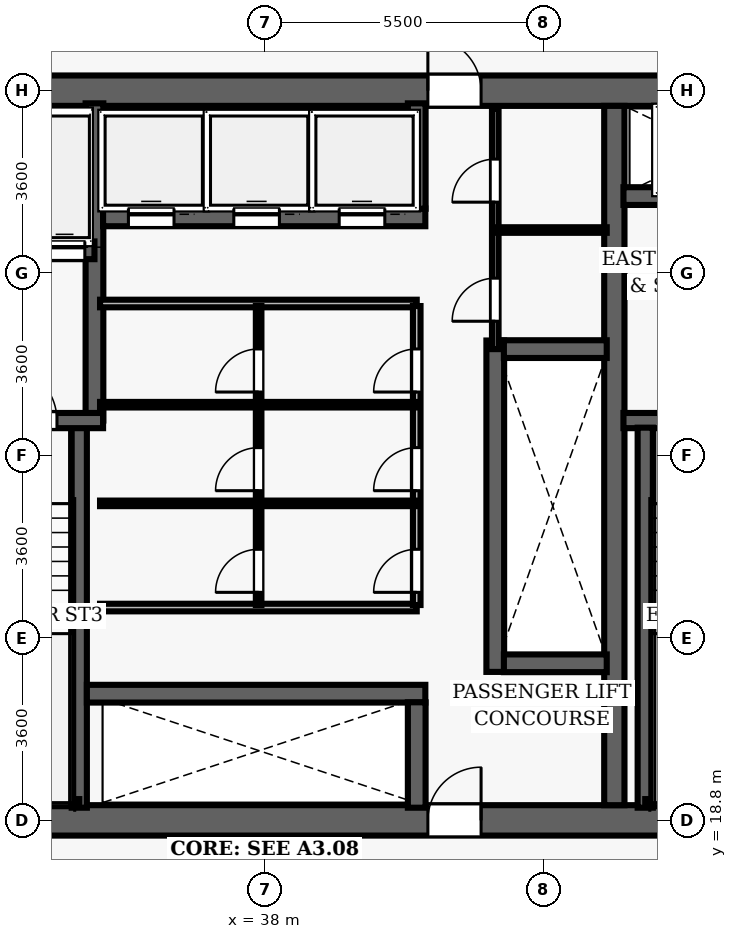
"""IFC4 building model, lengths in metres.
Left out: names, types, materials, properties, quantities, classifications, styles, units other than length and angle.
Written with IfcOpenShell. Run it as: python <this file> out.ifc"""

import sys

from ifc_helpers import new_model, si_unit, direction, frame, frame_2d, origin, place, context, subcontext, project, spatial, rectangle, extrude, element, fill, save


model = new_model("IFC4")
c1 = context("Model", 3, precision=1e-05, world=origin(), true_north=direction((0.0, 1.0)))
c2 = subcontext(c1, "Body", "Model", "MODEL_VIEW")
j1 = project(units=[si_unit("LENGTHUNIT", "METRE"), si_unit("PLANEANGLEUNIT", "RADIAN")], contexts=[c1])
p1 = place(None, origin())
s1 = spatial("IfcSite", under=j1, at=p1, CompositionType="ELEMENT")
p2 = place(p1, origin())
s2 = spatial("IfcBuilding", under=s1, at=p2, CompositionType="ELEMENT")
p3 = place(p2, frame((0.0, 0.0, 86.9)))
s3 = spatial("IfcBuildingStorey", under=s2, at=p3, CompositionType="ELEMENT", Elevation=86.9)
p4 = place(p3, frame((26.7, 18.8, 0.0), z_axis=(0.0, 0.0, 1.0), x_axis=(1.0, 0.0, 0.0)))
e1 = element("IfcWall", 1, at=p4, inside=s3, PredefinedType="SHEAR", context=c2, shape_type="SweptSolid", body=[
    extrude(rectangle(XDim=22.6, YDim=0.6, at=frame_2d((11.3, 0.0))), origin(), (0.0, 0.0, 1.0), 3.5),
])
p5 = place(p4, frame((14.52, 0.0, 0.0)))
e2 = element("IfcOpeningElement", 2, at=p5, cuts=e1, PredefinedType="OPENING", context=c2, shape_type="SweptSolid", body=[
    extrude(rectangle(XDim=1.05, YDim=2.15, at=frame_2d((0.525, 1.075))), frame((0.0, 0.31, 0.0), z_axis=(0.0, -1.0, 0.0), x_axis=(1.0, 0.0, 0.0)), (0.0, 0.0, 1.0), 0.62),
])
p6 = place(p3, frame((26.7, 33.2, 0.0), z_axis=(0.0, 0.0, 1.0), x_axis=(1.0, 0.0, 0.0)))
e3 = element("IfcWall", 3, at=p6, inside=s3, PredefinedType="SHEAR", context=c2, shape_type="SweptSolid", body=[
    extrude(rectangle(XDim=22.6, YDim=0.6, at=frame_2d((11.3, 0.0))), origin(), (0.0, 0.0, 1.0), 3.5),
])
p7 = place(p6, frame((4.62, 0.0, 0.0)))
e4 = element("IfcOpeningElement", 4, at=p7, cuts=e3, PredefinedType="OPENING", context=c2, shape_type="SweptSolid", body=[
    extrude(rectangle(XDim=1.05, YDim=2.15, at=frame_2d((0.525, 1.075))), frame((0.0, 0.31, 0.0), z_axis=(0.0, -1.0, 0.0), x_axis=(1.0, 0.0, 0.0)), (0.0, 0.0, 1.0), 0.62),
])
p8 = place(p6, frame((14.52, 0.0, 0.0)))
e5 = element("IfcOpeningElement", 5, at=p8, cuts=e3, PredefinedType="OPENING", context=c2, shape_type="SweptSolid", body=[
    extrude(rectangle(XDim=1.05, YDim=2.15, at=frame_2d((0.525, 1.075))), frame((0.0, 0.31, 0.0), z_axis=(0.0, -1.0, 0.0), x_axis=(1.0, 0.0, 0.0)), (0.0, 0.0, 1.0), 0.62),
])
p9 = place(p3, frame((44.9, 19.1, 0.0), z_axis=(0.0, 0.0, 1.0), x_axis=(0.0, 1.0, 0.0)))
e6 = element("IfcWall", 6, at=p9, inside=s3, PredefinedType="SHEAR", context=c2, shape_type="SweptSolid", body=[
    extrude(rectangle(XDim=13.8, YDim=0.4, at=frame_2d((6.9, 0.0))), origin(), (0.0, 0.0, 1.0), 3.5),
])
p10 = place(p3, frame((45.08, 26.69, 0.0), z_axis=(0.0, 0.0, 1.0), x_axis=(1.0, 0.0, 0.0)))
e7 = element("IfcWall", 7, at=p10, inside=s3, PredefinedType="SHEAR", context=c2, shape_type="SweptSolid", body=[
    extrude(rectangle(XDim=3.67, YDim=0.3, at=frame_2d((1.835, 0.0))), origin(), (0.0, 0.0, 1.0), 3.5),
])
p11 = place(p10, frame((1.05, 0.0, 0.0)))
e8 = element("IfcOpeningElement", 8, at=p11, cuts=e7, PredefinedType="OPENING", context=c2, shape_type="SweptSolid", body=[
    extrude(rectangle(XDim=1.1, YDim=2.15, at=frame_2d((0.55, 1.075))), frame((0.0, 0.16, 0.0), z_axis=(0.0, -1.0, 0.0), x_axis=(1.0, 0.0, 0.0)), (0.0, 0.0, 1.0), 0.32),
])
p12 = place(p3, frame((45.51, 19.05, 0.0), z_axis=(0.0, 0.0, 1.0), x_axis=(0.0, 1.0, 0.0)))
e9 = element("IfcWall", 9, at=p12, inside=s3, PredefinedType="SHEAR", context=c2, shape_type="SweptSolid", body=[
    extrude(rectangle(XDim=7.5, YDim=0.3, at=frame_2d((3.75, 0.0))), origin(), (0.0, 0.0, 1.0), 3.5),
])
p13 = place(p3, frame((45.51, 19.16, 0.0), z_axis=(0.0, 0.0, 1.0), x_axis=(1.0, 0.0, 0.0)))
e10 = element("IfcWall", 10, at=p13, inside=s3, PredefinedType="SHEAR", context=c2, shape_type="SweptSolid", body=[
    extrude(rectangle(XDim=3.095, YDim=0.12, at=frame_2d((1.547, 0.0))), origin(), (0.0, 0.0, 1.0), 3.5),
])
p14 = place(p3, frame((45.08, 31.12, 0.0), z_axis=(0.0, 0.0, 1.0), x_axis=(1.0, 0.0, 0.0)))
e11 = element("IfcWall", 11, at=p14, inside=s3, PredefinedType="SHEAR", context=c2, shape_type="SweptSolid", body=[
    extrude(rectangle(XDim=3.67, YDim=0.35, at=frame_2d((1.835, 0.0))), origin(), (0.0, 0.0, 1.0), 2.6),
])
p15 = place(p14, frame((1.25, 0.0, 0.0)))
e12 = element("IfcOpeningElement", 12, at=p15, cuts=e11, PredefinedType="OPENING", context=c2, shape_type="SweptSolid", body=[
    extrude(rectangle(XDim=1.1, YDim=2.15, at=frame_2d((0.55, 1.075))), frame((0.0, 0.185, 0.0), z_axis=(0.0, -1.0, 0.0), x_axis=(1.0, 0.0, 0.0)), (0.0, 0.0, 1.0), 0.37),
])
p16 = place(p3, frame((34.34, 19.05, 0.0), z_axis=(0.0, 0.0, 1.0), x_axis=(0.0, 1.0, 0.0)))
e13 = element("IfcWall", 13, at=p16, inside=s3, PredefinedType="SHEAR", context=c2, shape_type="SweptSolid", body=[
    extrude(rectangle(XDim=7.5, YDim=0.3, at=frame_2d((3.75, 0.0))), origin(), (0.0, 0.0, 1.0), 3.5),
])
p17 = place(p3, frame((34.64, 26.69, 0.0), z_axis=(0.0, 0.0, 1.0), x_axis=(0.0, 1.0, 0.0)))
e14 = element("IfcWall", 14, at=p17, inside=s3, PredefinedType="SHEAR", context=c2, shape_type="SweptSolid", body=[
    extrude(rectangle(XDim=6.26, YDim=0.35, at=frame_2d((3.13, 0.0))), origin(), (0.0, 0.0, 1.0), 3.5),
])
p18 = place(p3, frame((31.25, 26.69, 0.0), z_axis=(0.0, 0.0, 1.0), x_axis=(1.0, 0.0, 0.0)))
e15 = element("IfcWall", 15, at=p18, inside=s3, PredefinedType="SHEAR", context=c2, shape_type="SweptSolid", body=[
    extrude(rectangle(XDim=3.56, YDim=0.3, at=frame_2d((1.78, 0.0))), origin(), (0.0, 0.0, 1.0), 3.5),
])
p19 = place(p18, frame((1.55, 0.0, 0.0)))
e16 = element("IfcOpeningElement", 16, at=p19, cuts=e15, PredefinedType="OPENING", context=c2, shape_type="SweptSolid", body=[
    extrude(rectangle(XDim=1.1, YDim=2.15, at=frame_2d((0.55, 1.075))), frame((0.0, 0.16, 0.0), z_axis=(0.0, -1.0, 0.0), x_axis=(1.0, 0.0, 0.0)), (0.0, 0.0, 1.0), 0.32),
])
p20 = place(p3, frame((31.3, 19.16, 0.0), z_axis=(0.0, 0.0, 1.0), x_axis=(1.0, 0.0, 0.0)))
e17 = element("IfcWall", 17, at=p20, inside=s3, PredefinedType="SHEAR", context=c2, shape_type="SweptSolid", body=[
    extrude(rectangle(XDim=3.04, YDim=0.12, at=frame_2d((1.52, 0.0))), origin(), (0.0, 0.0, 1.0), 3.5),
])
p21 = place(p3, frame((32.23, 30.05, 0.0), z_axis=(0.0, 0.0, 1.0), x_axis=(1.0, 0.0, 0.0)))
e18 = element("IfcWall", 18, at=p21, inside=s3, PredefinedType="SHEAR", context=c2, shape_type="SweptSolid", body=[
    extrude(rectangle(XDim=2.41, YDim=0.35, at=frame_2d((1.205, 0.0))), origin(), (0.0, 0.0, 1.0), 2.6),
])
p22 = place(p21, frame((0.42, 0.0, 0.0)))
e19 = element("IfcOpeningElement", 19, at=p22, cuts=e18, PredefinedType="OPENING", context=c2, shape_type="SweptSolid", body=[
    extrude(rectangle(XDim=0.8, YDim=2.15, at=frame_2d((0.4, 1.075))), frame((0.0, 0.185, 0.0), z_axis=(0.0, -1.0, 0.0), x_axis=(1.0, 0.0, 0.0)), (0.0, 0.0, 1.0), 0.37),
])
p23 = place(p21, frame((1.42, 0.0, 0.0)))
e20 = element("IfcOpeningElement", 20, at=p23, cuts=e18, PredefinedType="OPENING", context=c2, shape_type="SweptSolid", body=[
    extrude(rectangle(XDim=0.8, YDim=2.15, at=frame_2d((0.4, 1.075))), frame((0.0, 0.185, 0.0), z_axis=(0.0, -1.0, 0.0), x_axis=(1.0, 0.0, 0.0)), (0.0, 0.0, 1.0), 0.37),
])
p24 = place(p3, frame((42.55, 21.73, 0.0), z_axis=(0.0, 0.0, 1.0), x_axis=(0.0, 1.0, 0.0)))
e21 = element("IfcWall", 21, at=p24, inside=s3, PredefinedType="SHEAR", context=c2, shape_type="SweptSolid", body=[
    extrude(rectangle(XDim=6.54, YDim=0.35, at=frame_2d((3.27, 0.0))), origin(), (0.0, 0.0, 1.0), 2.6),
])
for number, where, z_axis, x_axis in (
    (22, (42.72, 21.9, 0.0), (0.0, 0.0, 1.0), (1.0, 0.0, 0.0)),
    (23, (42.72, 28.1, 0.0), (0.0, 0.0, 1.0), (1.0, 0.0, 0.0)),
):
    element("IfcWall", number, at=place(p3, frame(where, z_axis=z_axis, x_axis=x_axis)), inside=s3, PredefinedType="SHEAR", context=c2, shape_type="SweptSolid", body=[
        extrude(rectangle(XDim=2.03, YDim=0.35, at=frame_2d((1.015, 0.0))), origin(), (0.0, 0.0, 1.0), 2.6),
    ])
p25 = place(p3, frame((34.81, 30.7, 0.0), z_axis=(0.0, 0.0, 1.0), x_axis=(1.0, 0.0, 0.0)))
e24 = element("IfcWall", 24, at=p25, inside=s3, PredefinedType="SHEAR", context=c2, shape_type="SweptSolid", body=[
    extrude(rectangle(XDim=6.36, YDim=0.35, at=frame_2d((3.18, 0.0))), origin(), (0.0, 0.0, 1.0), 2.6),
])
p26 = place(p25, frame((0.5, 0.0, 0.0)))
e25 = element("IfcOpeningElement", 25, at=p26, cuts=e24, PredefinedType="OPENING", context=c2, shape_type="SweptSolid", body=[
    extrude(rectangle(XDim=0.9, YDim=2.15, at=frame_2d((0.45, 1.075))), frame((0.0, 0.185, 0.0), z_axis=(0.0, -1.0, 0.0), x_axis=(1.0, 0.0, 0.0)), (0.0, 0.0, 1.0), 0.37),
])
p27 = place(p25, frame((2.58, 0.0, 0.0)))
e26 = element("IfcOpeningElement", 26, at=p27, cuts=e24, PredefinedType="OPENING", context=c2, shape_type="SweptSolid", body=[
    extrude(rectangle(XDim=0.9, YDim=2.15, at=frame_2d((0.45, 1.075))), frame((0.0, 0.185, 0.0), z_axis=(0.0, -1.0, 0.0), x_axis=(1.0, 0.0, 0.0)), (0.0, 0.0, 1.0), 0.37),
])
p28 = place(p25, frame((4.66, 0.0, 0.0)))
e27 = element("IfcOpeningElement", 27, at=p28, cuts=e24, PredefinedType="OPENING", context=c2, shape_type="SweptSolid", body=[
    extrude(rectangle(XDim=0.9, YDim=2.15, at=frame_2d((0.45, 1.075))), frame((0.0, 0.185, 0.0), z_axis=(0.0, -1.0, 0.0), x_axis=(1.0, 0.0, 0.0)), (0.0, 0.0, 1.0), 0.37),
])
p29 = place(p3, frame((41.0, 30.87, 0.0), z_axis=(0.0, 0.0, 1.0), x_axis=(0.0, 1.0, 0.0)))
e28 = element("IfcWall", 28, at=p29, inside=s3, PredefinedType="SHEAR", context=c2, shape_type="SweptSolid", body=[
    extrude(rectangle(XDim=2.08, YDim=0.35, at=frame_2d((1.04, 0.0))), origin(), (0.0, 0.0, 1.0), 2.6),
])
p30 = place(p3, frame((34.49, 21.3, 0.0), z_axis=(0.0, 0.0, 1.0), x_axis=(1.0, 0.0, 0.0)))
e29 = element("IfcWall", 29, at=p30, inside=s3, PredefinedType="SHEAR", context=c2, shape_type="SweptSolid", body=[
    extrude(rectangle(XDim=6.68, YDim=0.35, at=frame_2d((3.34, 0.0))), origin(), (0.0, 0.0, 1.0), 2.6),
])
p31 = place(p3, frame((41.0, 19.05, 0.0), z_axis=(0.0, 0.0, 1.0), x_axis=(0.0, 1.0, 0.0)))
e30 = element("IfcWall", 30, at=p31, inside=s3, PredefinedType="SHEAR", context=c2, shape_type="SweptSolid", body=[
    extrude(rectangle(XDim=2.08, YDim=0.35, at=frame_2d((1.04, 0.0))), origin(), (0.0, 0.0, 1.0), 2.6),
])
for number, where, z_axis, x_axis in (
    (31, (34.75, 29.0, 0.0), (0.0, 0.0, 1.0), (1.0, 0.0, 0.0)),
    (32, (34.75, 23.0, 0.0), (0.0, 0.0, 1.0), (1.0, 0.0, 0.0)),
):
    element("IfcWall", number, at=place(p3, frame(where, z_axis=z_axis, x_axis=x_axis)), inside=s3, PredefinedType="PARTITIONING", context=c2, shape_type="SweptSolid", body=[
        extrude(rectangle(XDim=6.25, YDim=0.15, at=frame_2d((3.125, 0.0))), origin(), (0.0, 0.0, 1.0), 2.6),
    ])
p32 = place(p3, frame((41.0, 23.05, 0.0), z_axis=(0.0, 0.0, 1.0), x_axis=(0.0, 1.0, 0.0)))
e33 = element("IfcWall", 33, at=p32, inside=s3, PredefinedType="PARTITIONING", context=c2, shape_type="SweptSolid", body=[
    extrude(rectangle(XDim=5.9, YDim=0.15, at=frame_2d((2.95, 0.0))), origin(), (0.0, 0.0, 1.0), 2.6),
])
p33 = place(p32, frame((0.25, 0.0, 0.0)))
e34 = element("IfcOpeningElement", 34, at=p33, cuts=e33, PredefinedType="OPENING", context=c2, shape_type="SweptSolid", body=[
    extrude(rectangle(XDim=0.85, YDim=2.1, at=frame_2d((0.425, 1.05))), frame((0.0, 0.085, 0.0), z_axis=(0.0, -1.0, 0.0), x_axis=(1.0, 0.0, 0.0)), (0.0, 0.0, 1.0), 0.17),
])
p34 = place(p32, frame((2.256, 0.0, 0.0)))
e35 = element("IfcOpeningElement", 35, at=p34, cuts=e33, PredefinedType="OPENING", context=c2, shape_type="SweptSolid", body=[
    extrude(rectangle(XDim=0.85, YDim=2.1, at=frame_2d((0.425, 1.05))), frame((0.0, 0.085, 0.0), z_axis=(0.0, -1.0, 0.0), x_axis=(1.0, 0.0, 0.0)), (0.0, 0.0, 1.0), 0.17),
])
p35 = place(p32, frame((4.203, 0.0, 0.0)))
e36 = element("IfcOpeningElement", 36, at=p35, cuts=e33, PredefinedType="OPENING", context=c2, shape_type="SweptSolid", body=[
    extrude(rectangle(XDim=0.85, YDim=2.1, at=frame_2d((0.425, 1.05))), frame((0.0, 0.085, 0.0), z_axis=(0.0, -1.0, 0.0), x_axis=(1.0, 0.0, 0.0)), (0.0, 0.0, 1.0), 0.17),
])
p36 = place(p3, frame((37.88, 23.05, 0.0), z_axis=(0.0, 0.0, 1.0), x_axis=(0.0, 1.0, 0.0)))
e37 = element("IfcWall", 37, at=p36, inside=s3, PredefinedType="PARTITIONING", context=c2, shape_type="SweptSolid", body=[
    extrude(rectangle(XDim=5.9, YDim=0.11, at=frame_2d((2.95, 0.0))), origin(), (0.0, 0.0, 1.0), 2.6),
])
p37 = place(p36, frame((0.25, 0.0, 0.0)))
e38 = element("IfcOpeningElement", 38, at=p37, cuts=e37, PredefinedType="OPENING", context=c2, shape_type="SweptSolid", body=[
    extrude(rectangle(XDim=0.85, YDim=2.1, at=frame_2d((0.425, 1.05))), frame((0.0, 0.065, 0.0), z_axis=(0.0, -1.0, 0.0), x_axis=(1.0, 0.0, 0.0)), (0.0, 0.0, 1.0), 0.13),
])
p38 = place(p36, frame((2.256, 0.0, 0.0)))
e39 = element("IfcOpeningElement", 39, at=p38, cuts=e37, PredefinedType="OPENING", context=c2, shape_type="SweptSolid", body=[
    extrude(rectangle(XDim=0.85, YDim=2.1, at=frame_2d((0.425, 1.05))), frame((0.0, 0.065, 0.0), z_axis=(0.0, -1.0, 0.0), x_axis=(1.0, 0.0, 0.0)), (0.0, 0.0, 1.0), 0.13),
])
p39 = place(p36, frame((4.203, 0.0, 0.0)))
e40 = element("IfcOpeningElement", 40, at=p39, cuts=e37, PredefinedType="OPENING", context=c2, shape_type="SweptSolid", body=[
    extrude(rectangle(XDim=0.85, YDim=2.1, at=frame_2d((0.425, 1.05))), frame((0.0, 0.065, 0.0), z_axis=(0.0, -1.0, 0.0), x_axis=(1.0, 0.0, 0.0)), (0.0, 0.0, 1.0), 0.13),
])
for number, where, z_axis, x_axis in (
    (41, (34.75, 25.056, 0.0), (0.0, 0.0, 1.0), (1.0, 0.0, 0.0)),
    (42, (34.75, 27.003, 0.0), (0.0, 0.0, 1.0), (1.0, 0.0, 0.0)),
):
    element("IfcWall", number, at=place(p3, frame(where, z_axis=z_axis, x_axis=x_axis)), inside=s3, PredefinedType="PARTITIONING", context=c2, shape_type="SweptSolid", body=[
        extrude(rectangle(XDim=6.25, YDim=0.11, at=frame_2d((3.125, 0.0))), origin(), (0.0, 0.0, 1.0), 2.6),
    ])
p40 = place(p3, frame((42.55, 28.1, 0.0), z_axis=(0.0, 0.0, 1.0), x_axis=(0.0, 1.0, 0.0)))
e43 = element("IfcWall", 43, at=p40, inside=s3, PredefinedType="PARTITIONING", context=c2, shape_type="SweptSolid", body=[
    extrude(rectangle(XDim=4.75, YDim=0.13, at=frame_2d((2.375, 0.0))), origin(), (0.0, 0.0, 1.0), 2.6),
])
p41 = place(p40, frame((0.55, 0.0, 0.0)))
e44 = element("IfcOpeningElement", 44, at=p41, cuts=e43, PredefinedType="OPENING", context=c2, shape_type="SweptSolid", body=[
    extrude(rectangle(XDim=0.85, YDim=2.1, at=frame_2d((0.425, 1.05))), frame((0.0, 0.075, 0.0), z_axis=(0.0, -1.0, 0.0), x_axis=(1.0, 0.0, 0.0)), (0.0, 0.0, 1.0), 0.15),
])
p42 = place(p40, frame((2.9, 0.0, 0.0)))
e45 = element("IfcOpeningElement", 45, at=p42, cuts=e43, PredefinedType="OPENING", context=c2, shape_type="SweptSolid", body=[
    extrude(rectangle(XDim=0.85, YDim=2.1, at=frame_2d((0.425, 1.05))), frame((0.0, 0.075, 0.0), z_axis=(0.0, -1.0, 0.0), x_axis=(1.0, 0.0, 0.0)), (0.0, 0.0, 1.0), 0.15),
])
p43 = place(p3, frame((42.55, 30.45, 0.0), z_axis=(0.0, 0.0, 1.0), x_axis=(1.0, 0.0, 0.0)))
e46 = element("IfcWall", 46, at=p43, inside=s3, PredefinedType="PARTITIONING", context=c2, shape_type="SweptSolid", body=[
    extrude(rectangle(XDim=2.2, YDim=0.11, at=frame_2d((1.1, 0.0))), origin(), (0.0, 0.0, 1.0), 2.6),
])
p44 = place(p19, origin())
e47 = element("IfcDoor", 47, at=p44, inside=s3, OperationType="SINGLE_SWING_LEFT", PredefinedType="DOOR", context=c2, shape_type="SweptSolid", body=[
    extrude(rectangle(XDim=1.1, YDim=2.15, at=frame_2d((0.55, 1.075))), frame((0.0, 0.025, 0.0), z_axis=(0.0, -1.0, 0.0), x_axis=(1.0, 0.0, 0.0)), (0.0, 0.0, 1.0), 0.05),
])
fill(e16, e47)
p45 = place(p8, origin())
e48 = element("IfcDoor", 48, at=p45, inside=s3, OperationType="SINGLE_SWING_LEFT", PredefinedType="DOOR", context=c2, shape_type="SweptSolid", body=[
    extrude(rectangle(XDim=1.05, YDim=2.15, at=frame_2d((0.525, 1.075))), frame((0.0, 0.025, 0.0), z_axis=(0.0, -1.0, 0.0), x_axis=(1.0, 0.0, 0.0)), (0.0, 0.0, 1.0), 0.05),
])
fill(e5, e48)
p46 = place(p5, origin())
e49 = element("IfcDoor", 49, at=p46, inside=s3, OperationType="SINGLE_SWING_RIGHT", PredefinedType="DOOR", context=c2, shape_type="SweptSolid", body=[
    extrude(rectangle(XDim=1.05, YDim=2.15, at=frame_2d((0.525, 1.075))), frame((0.0, 0.025, 0.0), z_axis=(0.0, -1.0, 0.0), x_axis=(1.0, 0.0, 0.0)), (0.0, 0.0, 1.0), 0.05),
])
fill(e2, e49)
p47 = place(p33, origin())
e50 = element("IfcDoor", 50, at=p47, inside=s3, OperationType="SINGLE_SWING_LEFT", PredefinedType="DOOR", context=c2, shape_type="SweptSolid", body=[
    extrude(rectangle(XDim=0.85, YDim=2.1, at=frame_2d((0.425, 1.05))), frame((0.0, 0.025, 0.0), z_axis=(0.0, -1.0, 0.0), x_axis=(1.0, 0.0, 0.0)), (0.0, 0.0, 1.0), 0.05),
])
fill(e34, e50)
p48 = place(p37, origin())
e51 = element("IfcDoor", 51, at=p48, inside=s3, OperationType="SINGLE_SWING_LEFT", PredefinedType="DOOR", context=c2, shape_type="SweptSolid", body=[
    extrude(rectangle(XDim=0.85, YDim=2.1, at=frame_2d((0.425, 1.05))), frame((0.0, 0.025, 0.0), z_axis=(0.0, -1.0, 0.0), x_axis=(1.0, 0.0, 0.0)), (0.0, 0.0, 1.0), 0.05),
])
fill(e38, e51)
p49 = place(p34, origin())
e52 = element("IfcDoor", 52, at=p49, inside=s3, OperationType="SINGLE_SWING_LEFT", PredefinedType="DOOR", context=c2, shape_type="SweptSolid", body=[
    extrude(rectangle(XDim=0.85, YDim=2.1, at=frame_2d((0.425, 1.05))), frame((0.0, 0.025, 0.0), z_axis=(0.0, -1.0, 0.0), x_axis=(1.0, 0.0, 0.0)), (0.0, 0.0, 1.0), 0.05),
])
fill(e35, e52)
p50 = place(p38, origin())
e53 = element("IfcDoor", 53, at=p50, inside=s3, OperationType="SINGLE_SWING_LEFT", PredefinedType="DOOR", context=c2, shape_type="SweptSolid", body=[
    extrude(rectangle(XDim=0.85, YDim=2.1, at=frame_2d((0.425, 1.05))), frame((0.0, 0.025, 0.0), z_axis=(0.0, -1.0, 0.0), x_axis=(1.0, 0.0, 0.0)), (0.0, 0.0, 1.0), 0.05),
])
fill(e39, e53)
p51 = place(p35, origin())
e54 = element("IfcDoor", 54, at=p51, inside=s3, OperationType="SINGLE_SWING_LEFT", PredefinedType="DOOR", context=c2, shape_type="SweptSolid", body=[
    extrude(rectangle(XDim=0.85, YDim=2.1, at=frame_2d((0.425, 1.05))), frame((0.0, 0.025, 0.0), z_axis=(0.0, -1.0, 0.0), x_axis=(1.0, 0.0, 0.0)), (0.0, 0.0, 1.0), 0.05),
])
fill(e36, e54)
p52 = place(p39, origin())
e55 = element("IfcDoor", 55, at=p52, inside=s3, OperationType="SINGLE_SWING_LEFT", PredefinedType="DOOR", context=c2, shape_type="SweptSolid", body=[
    extrude(rectangle(XDim=0.85, YDim=2.1, at=frame_2d((0.425, 1.05))), frame((0.0, 0.025, 0.0), z_axis=(0.0, -1.0, 0.0), x_axis=(1.0, 0.0, 0.0)), (0.0, 0.0, 1.0), 0.05),
])
fill(e40, e55)
p53 = place(p41, origin())
e56 = element("IfcDoor", 56, at=p53, inside=s3, OperationType="SINGLE_SWING_LEFT", PredefinedType="DOOR", context=c2, shape_type="SweptSolid", body=[
    extrude(rectangle(XDim=0.85, YDim=2.1, at=frame_2d((0.425, 1.05))), frame((0.0, 0.025, 0.0), z_axis=(0.0, -1.0, 0.0), x_axis=(1.0, 0.0, 0.0)), (0.0, 0.0, 1.0), 0.05),
])
fill(e44, e56)
p54 = place(p42, origin())
e57 = element("IfcDoor", 57, at=p54, inside=s3, OperationType="SINGLE_SWING_LEFT", PredefinedType="DOOR", context=c2, shape_type="SweptSolid", body=[
    extrude(rectangle(XDim=0.85, YDim=2.1, at=frame_2d((0.425, 1.05))), frame((0.0, 0.025, 0.0), z_axis=(0.0, -1.0, 0.0), x_axis=(1.0, 0.0, 0.0)), (0.0, 0.0, 1.0), 0.05),
])
fill(e45, e57)
p55 = place(p26, origin())
e58 = element("IfcDoor", 58, at=p55, inside=s3, OperationType="SLIDING_TO_LEFT", PredefinedType="DOOR", context=c2, shape_type="SweptSolid", body=[
    extrude(rectangle(XDim=0.9, YDim=2.15, at=frame_2d((0.45, 1.075))), frame((0.0, 0.025, 0.0), z_axis=(0.0, -1.0, 0.0), x_axis=(1.0, 0.0, 0.0)), (0.0, 0.0, 1.0), 0.05),
])
fill(e25, e58)
p56 = place(p27, origin())
e59 = element("IfcDoor", 59, at=p56, inside=s3, OperationType="SLIDING_TO_LEFT", PredefinedType="DOOR", context=c2, shape_type="SweptSolid", body=[
    extrude(rectangle(XDim=0.9, YDim=2.15, at=frame_2d((0.45, 1.075))), frame((0.0, 0.025, 0.0), z_axis=(0.0, -1.0, 0.0), x_axis=(1.0, 0.0, 0.0)), (0.0, 0.0, 1.0), 0.05),
])
fill(e26, e59)
p57 = place(p28, origin())
e60 = element("IfcDoor", 60, at=p57, inside=s3, OperationType="SLIDING_TO_LEFT", PredefinedType="DOOR", context=c2, shape_type="SweptSolid", body=[
    extrude(rectangle(XDim=0.9, YDim=2.15, at=frame_2d((0.45, 1.075))), frame((0.0, 0.025, 0.0), z_axis=(0.0, -1.0, 0.0), x_axis=(1.0, 0.0, 0.0)), (0.0, 0.0, 1.0), 0.05),
])
fill(e27, e60)
p58 = place(p23, origin())
e61 = element("IfcDoor", 61, at=p58, inside=s3, OperationType="SLIDING_TO_LEFT", PredefinedType="DOOR", context=c2, shape_type="SweptSolid", body=[
    extrude(rectangle(XDim=0.8, YDim=2.15, at=frame_2d((0.4, 1.075))), frame((0.0, 0.025, 0.0), z_axis=(0.0, -1.0, 0.0), x_axis=(1.0, 0.0, 0.0)), (0.0, 0.0, 1.0), 0.05),
])
fill(e20, e61)
save(model, sys.argv[1])
